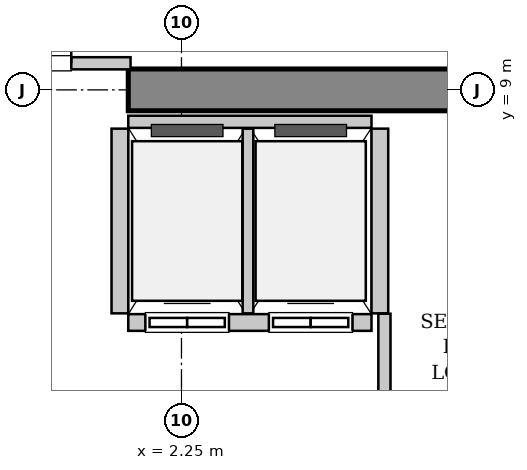
"""IFC4 building model, lengths in metres.
Left out: names, types, materials, properties, quantities, classifications, styles, units other than length and angle.
Written with IfcOpenShell. Run it as: python <this file> out.ifc"""

import sys

from ifc_helpers import new_model, si_unit, direction, frame, frame_2d, origin, place, context, subcontext, project, spatial, rectangle, extrude, source, transform, mapped, element, fill, save


model = new_model("IFC4")
c1 = context("Model", 3, precision=1e-05, world=origin(), true_north=direction((0.0, 1.0)))
c2 = subcontext(c1, "Body", "Model", "MODEL_VIEW")
j1 = project(units=[si_unit("LENGTHUNIT", "METRE"), si_unit("PLANEANGLEUNIT", "RADIAN")], contexts=[c1])
p1 = place(None, origin())
s1 = spatial("IfcSite", under=j1, at=p1, CompositionType="ELEMENT")
p2 = place(p1, origin())
s2 = spatial("IfcBuilding", under=s1, at=p2, CompositionType="ELEMENT")
p3 = place(p2, frame((0.0, 0.0, 121.2)))
s3 = spatial("IfcBuildingStorey", under=s2, at=p3, CompositionType="ELEMENT", Elevation=121.2)
m1 = source(origin(), c2, "Body", "SweptSolid", [
    extrude(rectangle(XDim=9.975, YDim=0.55, at=frame_2d((4.987, 0.0))), origin(), (0.0, 0.0, 1.0), 3.8),
])
p4 = place(p3, frame((1.55, 9.0, 0.0), z_axis=(0.0, 0.0, 1.0), x_axis=(1.0, 0.0, 0.0)))
e1 = element("IfcWall", 1, at=p4, inside=s3, PredefinedType="SHEAR", context=c2, shape_type="MappedRepresentation", body=[
    mapped(m1, transform((0.0, 0.0, 0.0), x_axis=(1.0, 0.0, 0.0), y_axis=(0.0, 1.0, 0.0), z_axis=(0.0, 0.0, 1.0), scale=1.0)),
])
m2 = source(origin(), c2, "Body", "SweptSolid", [
    extrude(rectangle(XDim=3.2, YDim=0.22, at=frame_2d((1.6, 0.0))), origin(), (0.0, 0.0, 1.0), 3.535),
])
p5 = place(p3, frame((1.55, 5.94, 0.0), z_axis=(0.0, 0.0, 1.0), x_axis=(1.0, 0.0, 0.0)))
e2 = element("IfcWall", 2, at=p5, inside=s3, PredefinedType="SOLIDWALL", context=c2, shape_type="MappedRepresentation", body=[
    mapped(m2, transform((0.0, 0.0, 0.0), x_axis=(1.0, 0.0, 0.0), y_axis=(0.0, 1.0, 0.0), z_axis=(0.0, 0.0, 1.0), scale=1.0)),
])
p6 = place(p5, frame((0.225, 0.0, 0.0)))
e3 = element("IfcOpeningElement", 3, at=p6, cuts=e2, PredefinedType="OPENING", context=c2, shape_type="SweptSolid", body=[
    extrude(rectangle(XDim=1.1, YDim=2.2, at=frame_2d((0.55, 1.1))), frame((0.0, 0.12, 0.0), z_axis=(0.0, -1.0, 0.0), x_axis=(1.0, 0.0, 0.0)), (0.0, 0.0, 1.0), 0.24),
])
p7 = place(p5, frame((1.85, 0.0, 0.0)))
e4 = element("IfcOpeningElement", 4, at=p7, cuts=e2, PredefinedType="OPENING", context=c2, shape_type="SweptSolid", body=[
    extrude(rectangle(XDim=1.1, YDim=2.2, at=frame_2d((0.55, 1.1))), frame((0.0, 0.12, 0.0), z_axis=(0.0, -1.0, 0.0), x_axis=(1.0, 0.0, 0.0)), (0.0, 0.0, 1.0), 0.24),
])
m3 = source(origin(), c2, "Body", "SweptSolid", [
    extrude(rectangle(XDim=3.2, YDim=0.16, at=frame_2d((1.6, 0.0))), origin(), (0.0, 0.0, 1.0), 2.425),
])
p8 = place(p3, frame((4.75, 8.58, 0.0), z_axis=(0.0, 0.0, 1.0), x_axis=(-1.0, 0.0, 0.0)))
e5 = element("IfcWall", 5, at=p8, inside=s3, PredefinedType="PARTITIONING", context=c2, shape_type="MappedRepresentation", body=[
    mapped(m3, transform((0.0, 0.0, 0.0), x_axis=(1.0, 0.0, 0.0), y_axis=(0.0, 1.0, 0.0), z_axis=(0.0, 0.0, 1.0), scale=1.0)),
])
m4 = source(origin(), c2, "Body", "SweptSolid", [
    extrude(rectangle(XDim=2.43, YDim=0.22, at=frame_2d((1.215, 0.0))), origin(), (0.0, 0.0, 1.0), 3.535),
])
p9 = place(p3, frame((1.44, 8.49, 0.0), z_axis=(0.0, 0.0, 1.0), x_axis=(0.0, -1.0, 0.0)))
e6 = element("IfcWall", 6, at=p9, inside=s3, PredefinedType="SOLIDWALL", context=c2, shape_type="MappedRepresentation", body=[
    mapped(m4, transform((0.0, 0.0, 0.0), x_axis=(1.0, 0.0, 0.0), y_axis=(0.0, 1.0, 0.0), z_axis=(0.0, 0.0, 1.0), scale=1.0)),
])
m5 = source(origin(), c2, "Body", "SweptSolid", [
    extrude(rectangle(XDim=2.43, YDim=0.14, at=frame_2d((1.215, 0.0))), origin(), (0.0, 0.0, 1.0), 3.535),
])
p10 = place(p3, frame((3.125, 6.06, 0.0), z_axis=(0.0, 0.0, 1.0), x_axis=(0.0, 1.0, 0.0)))
e7 = element("IfcWall", 7, at=p10, inside=s3, PredefinedType="PARTITIONING", context=c2, shape_type="MappedRepresentation", body=[
    mapped(m5, transform((0.0, 0.0, 0.0), x_axis=(1.0, 0.0, 0.0), y_axis=(0.0, 1.0, 0.0), z_axis=(0.0, 0.0, 1.0), scale=1.0)),
])
p11 = place(p3, frame((4.86, 6.06, 0.0), z_axis=(0.0, 0.0, 1.0), x_axis=(0.0, 1.0, 0.0)))
e8 = element("IfcWall", 8, at=p11, inside=s3, PredefinedType="SOLIDWALL", context=c2, shape_type="MappedRepresentation", body=[
    mapped(m4, transform((0.0, 0.0, 0.0), x_axis=(1.0, 0.0, 0.0), y_axis=(0.0, 1.0, 0.0), z_axis=(0.0, 0.0, 1.0), scale=1.0)),
])
m6 = source(origin(), c2, "Body", "SweptSolid", [
    extrude(rectangle(XDim=3.16, YDim=0.16, at=frame_2d((1.58, 0.0))), origin(), (0.0, 0.0, 1.0), 2.425),
])
p12 = place(p3, frame((-1.58, 9.35, 0.0), z_axis=(0.0, 0.0, 1.0), x_axis=(1.0, 0.0, 0.0)))
e9 = element("IfcWall", 9, at=p12, inside=s3, PredefinedType="PARTITIONING", context=c2, shape_type="MappedRepresentation", body=[
    mapped(m6, transform((0.0, 0.0, 0.0), x_axis=(1.0, 0.0, 0.0), y_axis=(0.0, 1.0, 0.0), z_axis=(0.0, 0.0, 1.0), scale=1.0)),
])
p13 = place(p12, frame((0.78, 0.0, 0.0)))
e10 = element("IfcOpeningElement", 10, at=p13, cuts=e9, PredefinedType="OPENING", context=c2, shape_type="SweptSolid", body=[
    extrude(rectangle(XDim=1.6, YDim=2.3, at=frame_2d((0.8, 1.15))), frame((0.0, 0.09, 0.0), z_axis=(0.0, -1.0, 0.0), x_axis=(1.0, 0.0, 0.0)), (0.0, 0.0, 1.0), 0.18),
])
m7 = source(origin(), c2, "Body", "SweptSolid", [
    extrude(rectangle(XDim=3.015, YDim=0.16, at=frame_2d((1.507, 0.0))), origin(), (0.0, 0.0, 1.0), 3.535),
])
p14 = place(p3, frame((4.92, 3.04, 0.0), z_axis=(0.0, 0.0, 1.0), x_axis=(0.0, 1.0, 0.0)))
e11 = element("IfcWall", 11, at=p14, inside=s3, PredefinedType="PARTITIONING", context=c2, shape_type="MappedRepresentation", body=[
    mapped(m7, transform((0.0, 0.0, 0.0), x_axis=(1.0, 0.0, 0.0), y_axis=(0.0, 1.0, 0.0), z_axis=(0.0, 0.0, 1.0), scale=1.0)),
])
m8 = source(origin(), c2, "Body", "SweptSolid", [
    extrude(rectangle(XDim=1.1, YDim=2.2, at=frame_2d((0.55, 1.1))), frame((0.0, 0.025, 0.0), z_axis=(0.0, -1.0, 0.0), x_axis=(1.0, 0.0, 0.0)), (0.0, 0.0, 1.0), 0.05),
])
p15 = place(p6, origin())
e12 = element("IfcDoor", 12, at=p15, inside=s3, OperationType="DOUBLE_DOOR_SLIDING", PredefinedType="DOOR", context=c2, shape_type="MappedRepresentation", body=[
    mapped(m8, transform((0.0, 0.0, 0.0), x_axis=(1.0, 0.0, 0.0), y_axis=(0.0, 1.0, 0.0), z_axis=(0.0, 0.0, 1.0), scale=1.0)),
])
fill(e3, e12)
p16 = place(p7, origin())
e13 = element("IfcDoor", 13, at=p16, inside=s3, OperationType="DOUBLE_DOOR_SLIDING", PredefinedType="DOOR", context=c2, shape_type="MappedRepresentation", body=[
    mapped(m8, transform((0.0, 0.0, 0.0), x_axis=(1.0, 0.0, 0.0), y_axis=(0.0, 1.0, 0.0), z_axis=(0.0, 0.0, 1.0), scale=1.0)),
])
fill(e4, e13)
m9 = source(origin(), c2, "Body", "SweptSolid", [
    extrude(rectangle(XDim=1.6, YDim=2.3, at=frame_2d((0.8, 1.15))), frame((0.0, 0.025, 0.0), z_axis=(0.0, -1.0, 0.0), x_axis=(1.0, 0.0, 0.0)), (0.0, 0.0, 1.0), 0.05),
])
p17 = place(p13, origin())
e14 = element("IfcDoor", 14, at=p17, inside=s3, OperationType="DOUBLE_DOOR_SINGLE_SWING", PredefinedType="DOOR", context=c2, shape_type="MappedRepresentation", body=[
    mapped(m9, transform((0.0, 0.0, 0.0), x_axis=(1.0, 0.0, 0.0), y_axis=(0.0, 1.0, 0.0), z_axis=(0.0, 0.0, 1.0), scale=1.0)),
])
fill(e10, e14)
save(model, sys.argv[1])
